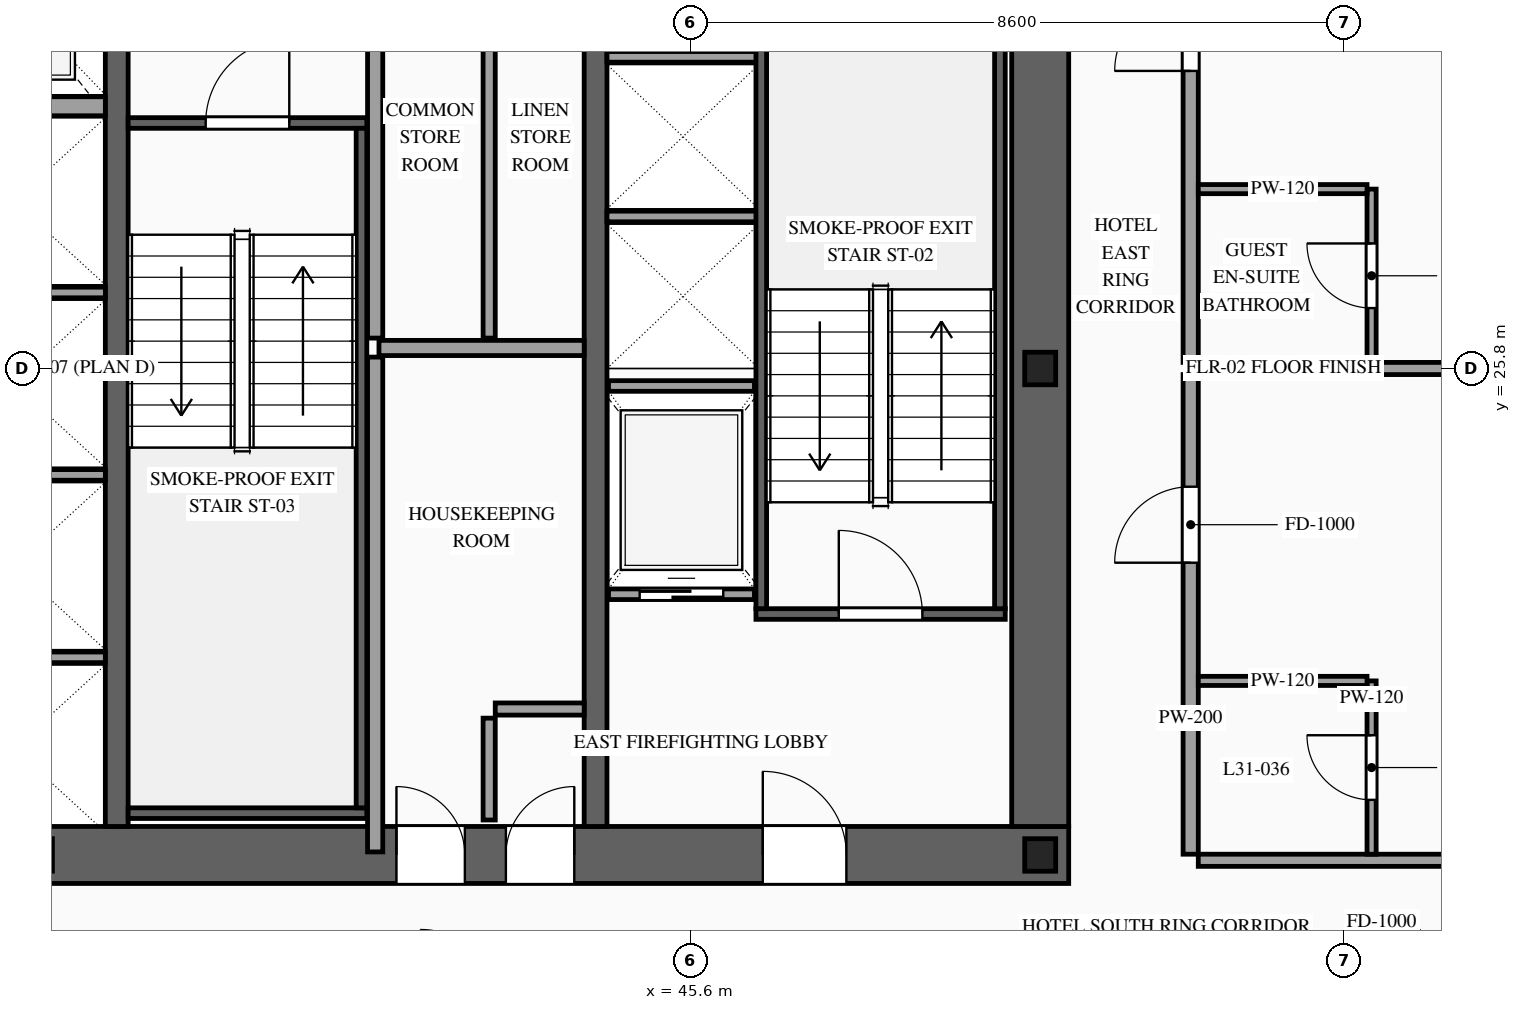
"""IFC4 building model, lengths in metres.
Left out: names, types, materials, properties, quantities, classifications, styles, units other than length and angle.
Written with IfcOpenShell. Run it as: python <this file> out.ifc"""

import sys

from ifc_helpers import new_model, si_unit, direction, frame, frame_2d, origin, origin_2d, place, context, subcontext, project, spatial, rectangle, i_section, extrude, source, transform, mapped, element, fill, save


model = new_model("IFC4")
c1 = context("Model", 3, precision=1e-05, world=origin(), true_north=direction((0.0, 1.0)))
c2 = subcontext(c1, "Body", "Model", "MODEL_VIEW")
j1 = project(units=[si_unit("LENGTHUNIT", "METRE"), si_unit("PLANEANGLEUNIT", "RADIAN")], contexts=[c1])
p1 = place(None, origin())
s1 = spatial("IfcSite", under=j1, at=p1, CompositionType="ELEMENT")
p2 = place(p1, origin())
s2 = spatial("IfcBuilding", under=s1, at=p2, CompositionType="ELEMENT")
p3 = place(p2, frame((0.0, 0.0, 119.0)))
s3 = spatial("IfcBuildingStorey", under=s2, at=p3, CompositionType="ELEMENT", Elevation=119.0)
p4 = place(p3, frame((23.425, 19.4, 0.0), z_axis=(0.0, 0.0, 1.0), x_axis=(1.0, 0.0, 0.0)))
e1 = element("IfcWall", 1, at=p4, inside=s3, PredefinedType="SHEAR", context=c2, shape_type="SweptSolid", body=[
    extrude(rectangle(XDim=27.15, YDim=0.75, at=frame_2d((13.575, 0.0))), origin(), (0.0, 0.0, 1.0), 3.6),
])
p5 = place(p4, frame((2.025, 0.0, 0.0)))
e2 = element("IfcOpeningElement", 2, at=p5, cuts=e1, PredefinedType="OPENING", context=c2, shape_type="SweptSolid", body=[
    extrude(rectangle(XDim=1.1, YDim=2.2, at=frame_2d((0.55, 1.1))), frame((0.0, 0.39, 0.0), z_axis=(0.0, -1.0, 0.0), x_axis=(1.0, 0.0, 0.0)), (0.0, 0.0, 1.0), 0.78),
])
p6 = place(p4, frame((9.925, 0.0, 0.0)))
e3 = element("IfcOpeningElement", 3, at=p6, cuts=e1, PredefinedType="OPENING", context=c2, shape_type="SweptSolid", body=[
    extrude(rectangle(XDim=1.1, YDim=2.2, at=frame_2d((0.55, 1.1))), frame((0.0, 0.39, 0.0), z_axis=(0.0, -1.0, 0.0), x_axis=(1.0, 0.0, 0.0)), (0.0, 0.0, 1.0), 0.78),
])
p7 = place(p4, frame((23.125, 0.0, 0.0)))
e4 = element("IfcOpeningElement", 4, at=p7, cuts=e1, PredefinedType="OPENING", context=c2, shape_type="SweptSolid", body=[
    extrude(rectangle(XDim=1.1, YDim=2.2, at=frame_2d((0.55, 1.1))), frame((0.0, 0.39, 0.0), z_axis=(0.0, -1.0, 0.0), x_axis=(1.0, 0.0, 0.0)), (0.0, 0.0, 1.0), 0.78),
])
p8 = place(p4, frame((19.745, 0.0, 0.0)))
e5 = element("IfcOpeningElement", 5, at=p8, cuts=e1, PredefinedType="OPENING", context=c2, shape_type="SweptSolid", body=[
    extrude(rectangle(XDim=0.9, YDim=2.15, at=frame_2d((0.45, 1.075))), frame((0.0, 0.39, 0.0), z_axis=(0.0, -1.0, 0.0), x_axis=(1.0, 0.0, 0.0)), (0.0, 0.0, 1.0), 0.78),
])
p9 = place(p4, frame((18.305, 0.0, 0.0)))
e6 = element("IfcOpeningElement", 6, at=p9, cuts=e1, PredefinedType="OPENING", context=c2, shape_type="SweptSolid", body=[
    extrude(rectangle(XDim=0.9, YDim=2.15, at=frame_2d((0.45, 1.075))), frame((0.0, 0.39, 0.0), z_axis=(0.0, -1.0, 0.0), x_axis=(1.0, 0.0, 0.0)), (0.0, 0.0, 1.0), 0.78),
])
m1 = source(origin(), c2, "Body", "SweptSolid", [
    extrude(rectangle(XDim=12.05, YDim=0.75, at=frame_2d((6.025, 0.0))), origin(), (0.0, 0.0, 1.0), 3.6),
])
p10 = place(p3, frame((50.2, 19.775, 0.0), z_axis=(0.0, 0.0, 1.0), x_axis=(0.0, 1.0, 0.0)))
e7 = element("IfcWall", 7, at=p10, inside=s3, PredefinedType="SHEAR", context=c2, shape_type="MappedRepresentation", body=[
    mapped(m1, transform((0.0, 0.0, 0.0), scale=1.0)),
])
m2 = source(origin(), c2, "Body", "SweptSolid", [
    extrude(rectangle(XDim=12.05, YDim=0.3, at=frame_2d((6.025, 0.0))), origin(), (0.0, 0.0, 1.0), 3.6),
])
for number, where, z_axis, x_axis in (
    (8, (38.05, 19.775, 0.0), (0.0, 0.0, 1.0), (0.0, 1.0, 0.0)),
    (9, (44.35, 19.775, 0.0), (0.0, 0.0, 1.0), (0.0, 1.0, 0.0)),
):
    element("IfcWall", number, at=place(p3, frame(where, z_axis=z_axis, x_axis=x_axis)), inside=s3, PredefinedType="SOLIDWALL", context=c2, shape_type="MappedRepresentation", body=[
        mapped(m2, transform((0.0, 0.0, 0.0), scale=1.0)),
    ])
m3 = source(origin(), c2, "Body", "SweptSolid", [
    extrude(i_section(OverallWidth=0.407, OverallDepth=0.428, WebThickness=0.02, FlangeThickness=0.035, at=origin_2d()), origin(), (0.0, 0.0, 1.0), 3.6),
])
for number, where, z_axis, x_axis in (
    (10, (37.0, 19.4, 0.0), (0.0, 0.0, 1.0), (1.0, 0.0, 0.0)),
    (11, (50.2, 19.4, 0.0), (0.0, 0.0, 1.0), (1.0, 0.0, 0.0)),
    (12, (50.2, 25.8, 0.0), (0.0, 0.0, 1.0), (1.0, 0.0, 0.0)),
):
    element("IfcColumn", number, at=place(p3, frame(where, z_axis=z_axis, x_axis=x_axis)), inside=s3, PredefinedType="COLUMN", context=c2, shape_type="MappedRepresentation", body=[
        mapped(m3, transform((0.0, 0.0, 0.0), scale=1.0)),
    ])
p11 = place(p3, frame((44.52, 22.83, 0.0), z_axis=(0.0, 0.0, 1.0), x_axis=(1.0, 0.0, 0.0)))
e13 = element("IfcWall", 13, at=p11, inside=s3, PredefinedType="SOLIDWALL", context=c2, shape_type="SweptSolid", body=[
    extrude(rectangle(XDim=1.92, YDim=0.14, at=frame_2d((0.96, 0.0))), origin(), (0.0, 0.0, 1.0), 3.38),
])
p12 = place(p11, frame((0.41, 0.0, 0.0)))
e14 = element("IfcOpeningElement", 14, at=p12, cuts=e13, PredefinedType="OPENING", context=c2, shape_type="SweptSolid", body=[
    extrude(rectangle(XDim=1.1, YDim=2.2, at=frame_2d((0.55, 1.1))), frame((0.0, 0.085, 0.0), z_axis=(0.0, -1.0, 0.0), x_axis=(1.0, 0.0, 0.0)), (0.0, 0.0, 1.0), 0.17),
])
m4 = source(origin(), c2, "Body", "SweptSolid", [
    extrude(rectangle(XDim=1.92, YDim=0.14, at=frame_2d((0.96, 0.0))), origin(), (0.0, 0.0, 1.0), 3.38),
])
p13 = place(p3, frame((44.52, 25.57, 0.0), z_axis=(0.0, 0.0, 1.0), x_axis=(1.0, 0.0, 0.0)))
e15 = element("IfcWall", 15, at=p13, inside=s3, PredefinedType="SOLIDWALL", context=c2, shape_type="MappedRepresentation", body=[
    mapped(m4, transform((0.0, 0.0, 0.0), scale=1.0)),
])
m5 = source(origin(), c2, "Body", "SweptSolid", [
    extrude(rectangle(XDim=2.4, YDim=0.14, at=frame_2d((1.2, 0.0))), origin(), (0.0, 0.0, 1.0), 3.38),
])
for number, where, z_axis, x_axis in (
    (16, (35.5, 22.0, 0.0), (0.0, 0.0, 1.0), (1.0, 0.0, 0.0)),
    (17, (35.5, 24.4, 0.0), (0.0, 0.0, 1.0), (1.0, 0.0, 0.0)),
    (18, (35.5, 26.8, 0.0), (0.0, 0.0, 1.0), (1.0, 0.0, 0.0)),
):
    element("IfcWall", number, at=place(p3, frame(where, z_axis=z_axis, x_axis=x_axis)), inside=s3, PredefinedType="SOLIDWALL", context=c2, shape_type="MappedRepresentation", body=[
        mapped(m5, transform((0.0, 0.0, 0.0), scale=1.0)),
    ])
m6 = source(origin(), c2, "Body", "SweptSolid", [
    extrude(rectangle(XDim=2.4, YDim=0.25, at=frame_2d((1.2, 0.0))), origin(), (0.0, 0.0, 1.0), 3.38),
])
p14 = place(p3, frame((35.5, 29.25, 0.0), z_axis=(0.0, 0.0, 1.0), x_axis=(1.0, 0.0, 0.0)))
e19 = element("IfcWall", 19, at=p14, inside=s3, PredefinedType="SOLIDWALL", context=c2, shape_type="MappedRepresentation", body=[
    mapped(m6, transform((0.0, 0.0, 0.0), scale=1.0)),
])
m7 = source(origin(), c2, "Body", "SweptSolid", [
    extrude(rectangle(XDim=2.0, YDim=0.14, at=frame_2d((1.0, 0.0))), origin(), (0.0, 0.0, 1.0), 3.38),
])
for number, where, z_axis, x_axis in (
    (20, (44.5, 27.8, 0.0), (0.0, 0.0, 1.0), (1.0, 0.0, 0.0)),
    (21, (44.5, 29.9, 0.0), (0.0, 0.0, 1.0), (1.0, 0.0, 0.0)),
):
    element("IfcWall", number, at=place(p3, frame(where, z_axis=z_axis, x_axis=x_axis)), inside=s3, PredefinedType="SOLIDWALL", context=c2, shape_type="MappedRepresentation", body=[
        mapped(m7, transform((0.0, 0.0, 0.0), scale=1.0)),
    ])
p15 = place(p3, frame((46.46, 22.57, 0.0), z_axis=(0.0, 0.0, 1.0), x_axis=(1.0, 0.0, 0.0)))
e22 = element("IfcWall", 22, at=p15, inside=s3, PredefinedType="SOLIDWALL", context=c2, shape_type="SweptSolid", body=[
    extrude(rectangle(XDim=3.28, YDim=0.14, at=frame_2d((1.64, 0.0))), origin(), (0.0, 0.0, 1.0), 3.38),
])
p16 = place(p15, frame((1.09, 0.0, 0.0)))
e23 = element("IfcOpeningElement", 23, at=p16, cuts=e22, PredefinedType="OPENING", context=c2, shape_type="SweptSolid", body=[
    extrude(rectangle(XDim=1.1, YDim=2.2, at=frame_2d((0.55, 1.1))), frame((0.0, 0.085, 0.0), z_axis=(0.0, -1.0, 0.0), x_axis=(1.0, 0.0, 0.0)), (0.0, 0.0, 1.0), 0.17),
])
m8 = source(origin(), c2, "Body", "SweptSolid", [
    extrude(rectangle(XDim=8.94, YDim=0.14, at=frame_2d((4.47, 0.0))), origin(), (0.0, 0.0, 1.0), 3.38),
])
for number, where, z_axis, x_axis in (
    (24, (46.53, 22.64, 0.0), (0.0, 0.0, 1.0), (0.0, 1.0, 0.0)),
    (25, (49.67, 22.64, 0.0), (0.0, 0.0, 1.0), (0.0, 1.0, 0.0)),
):
    element("IfcWall", number, at=place(p3, frame(where, z_axis=z_axis, x_axis=x_axis)), inside=s3, PredefinedType="SOLIDWALL", context=c2, shape_type="MappedRepresentation", body=[
        mapped(m8, transform((0.0, 0.0, 0.0), scale=1.0)),
    ])
p17 = place(p3, frame((38.2, 29.03, 0.0), z_axis=(0.0, 0.0, 1.0), x_axis=(1.0, 0.0, 0.0)))
e26 = element("IfcWall", 26, at=p17, inside=s3, PredefinedType="SOLIDWALL", context=c2, shape_type="SweptSolid", body=[
    extrude(rectangle(XDim=3.14, YDim=0.14, at=frame_2d((1.57, 0.0))), origin(), (0.0, 0.0, 1.0), 3.38),
])
p18 = place(p17, frame((1.02, 0.0, 0.0)))
e27 = element("IfcOpeningElement", 27, at=p18, cuts=e26, PredefinedType="OPENING", context=c2, shape_type="SweptSolid", body=[
    extrude(rectangle(XDim=1.1, YDim=2.2, at=frame_2d((0.55, 1.1))), frame((0.0, 0.085, 0.0), z_axis=(0.0, -1.0, 0.0), x_axis=(1.0, 0.0, 0.0)), (0.0, 0.0, 1.0), 0.17),
])
m9 = source(origin(), c2, "Body", "SweptSolid", [
    extrude(rectangle(XDim=3.14, YDim=0.14, at=frame_2d((1.57, 0.0))), origin(), (0.0, 0.0, 1.0), 3.38),
])
p19 = place(p3, frame((38.2, 19.95, 0.0), z_axis=(0.0, 0.0, 1.0), x_axis=(1.0, 0.0, 0.0)))
e28 = element("IfcWall", 28, at=p19, inside=s3, PredefinedType="SOLIDWALL", context=c2, shape_type="MappedRepresentation", body=[
    mapped(m9, transform((0.0, 0.0, 0.0), scale=1.0)),
])
m10 = source(origin(), c2, "Body", "SweptSolid", [
    extrude(rectangle(XDim=8.94, YDim=0.14, at=frame_2d((4.47, 0.0))), origin(), (0.0, 0.0, 1.0), 3.38),
])
p20 = place(p3, frame((41.27, 20.02, 0.0), z_axis=(0.0, 0.0, 1.0), x_axis=(0.0, 1.0, 0.0)))
e29 = element("IfcWall", 29, at=p20, inside=s3, PredefinedType="SOLIDWALL", context=c2, shape_type="MappedRepresentation", body=[
    mapped(m10, transform((0.0, 0.0, 0.0), scale=1.0)),
])
m11 = source(origin(), c2, "Body", "SweptSolid", [
    extrude(rectangle(XDim=1.34, YDim=0.16, at=frame_2d((0.67, 0.0))), origin(), (0.0, 0.0, 1.0), 3.38),
])
p21 = place(p3, frame((42.95, 19.86, 0.0), z_axis=(0.0, 0.0, 1.0), x_axis=(0.0, 1.0, 0.0)))
e30 = element("IfcWall", 30, at=p21, inside=s3, PredefinedType="PARTITIONING", context=c2, shape_type="MappedRepresentation", body=[
    mapped(m11, transform((0.0, 0.0, 0.0), scale=1.0)),
])
m12 = source(origin(), c2, "Body", "SweptSolid", [
    extrude(rectangle(XDim=1.17, YDim=0.16, at=frame_2d((0.585, 0.0))), origin(), (0.0, 0.0, 1.0), 3.38),
])
p22 = place(p3, frame((43.03, 21.32, 0.0), z_axis=(0.0, 0.0, 1.0), x_axis=(1.0, 0.0, 0.0)))
e31 = element("IfcWall", 31, at=p22, inside=s3, PredefinedType="PARTITIONING", context=c2, shape_type="MappedRepresentation", body=[
    mapped(m12, transform((0.0, 0.0, 0.0), scale=1.0)),
])
m13 = source(origin(), c2, "Body", "SweptSolid", [
    extrude(rectangle(XDim=6.51, YDim=0.2, at=frame_2d((3.255, 0.0))), origin(), (0.0, 0.0, 1.0), 3.38),
])
p23 = place(p3, frame((41.45, 19.44, 0.0), z_axis=(0.0, 0.0, 1.0), x_axis=(0.0, 1.0, 0.0)))
e32 = element("IfcWall", 32, at=p23, inside=s3, PredefinedType="PARTITIONING", context=c2, shape_type="MappedRepresentation", body=[
    mapped(m13, transform((0.0, 0.0, 0.0), scale=1.0)),
])
m14 = source(origin(), c2, "Body", "SweptSolid", [
    extrude(rectangle(XDim=2.7, YDim=0.2, at=frame_2d((1.35, 0.0))), origin(), (0.0, 0.0, 1.0), 3.38),
])
p24 = place(p3, frame((41.5, 26.07, 0.0), z_axis=(0.0, 0.0, 1.0), x_axis=(1.0, 0.0, 0.0)))
e33 = element("IfcWall", 33, at=p24, inside=s3, PredefinedType="PARTITIONING", context=c2, shape_type="MappedRepresentation", body=[
    mapped(m14, transform((0.0, 0.0, 0.0), scale=1.0)),
])
m15 = source(origin(), c2, "Body", "SweptSolid", [
    extrude(rectangle(XDim=5.96, YDim=0.2, at=frame_2d((2.98, 0.0))), origin(), (0.0, 0.0, 1.0), 3.38),
])
p25 = place(p3, frame((41.45, 26.2, 0.0), z_axis=(0.0, 0.0, 1.0), x_axis=(0.0, 1.0, 0.0)))
e34 = element("IfcWall", 34, at=p25, inside=s3, PredefinedType="PARTITIONING", context=c2, shape_type="MappedRepresentation", body=[
    mapped(m15, transform((0.0, 0.0, 0.0), scale=1.0)),
])
m16 = source(origin(), c2, "Body", "SweptSolid", [
    extrude(rectangle(XDim=5.96, YDim=0.16, at=frame_2d((2.98, 0.0))), origin(), (0.0, 0.0, 1.0), 3.38),
])
p26 = place(p3, frame((42.95, 26.2, 0.0), z_axis=(0.0, 0.0, 1.0), x_axis=(0.0, 1.0, 0.0)))
e35 = element("IfcWall", 35, at=p26, inside=s3, PredefinedType="PARTITIONING", context=c2, shape_type="MappedRepresentation", body=[
    mapped(m16, transform((0.0, 0.0, 0.0), scale=1.0)),
])
p27 = place(p3, frame((52.18, 19.41, 0.0), z_axis=(0.0, 0.0, 1.0), x_axis=(0.0, 1.0, 0.0)))
e36 = element("IfcWall", 36, at=p27, inside=s3, PredefinedType="PARTITIONING", context=c2, shape_type="SweptSolid", body=[
    extrude(rectangle(XDim=6.31, YDim=0.2, at=frame_2d((3.155, 0.0))), origin(), (0.0, 0.0, 1.0), 3.38),
])
p28 = place(p27, frame((3.835, 0.0, 0.0)))
e37 = element("IfcOpeningElement", 37, at=p28, cuts=e36, PredefinedType="OPENING", context=c2, shape_type="SweptSolid", body=[
    extrude(rectangle(XDim=1.0, YDim=2.2, at=frame_2d((0.5, 1.1))), frame((0.0, 0.115, 0.0), z_axis=(0.0, -1.0, 0.0), x_axis=(1.0, 0.0, 0.0)), (0.0, 0.0, 1.0), 0.23),
])
m17 = source(origin(), c2, "Body", "SweptSolid", [
    extrude(rectangle(XDim=8.17, YDim=0.16, at=frame_2d((4.085, 0.0))), origin(), (0.0, 0.0, 1.0), 2.675),
])
p29 = place(p3, frame((52.28, 25.8, 0.0), z_axis=(0.0, 0.0, 1.0), x_axis=(1.0, 0.0, 0.0)))
e38 = element("IfcWall", 38, at=p29, inside=s3, PredefinedType="PARTITIONING", context=c2, shape_type="MappedRepresentation", body=[
    mapped(m17, transform((0.0, 0.0, 0.0), scale=1.0)),
])
m18 = source(origin(), c2, "Body", "SweptSolid", [
    extrude(rectangle(XDim=8.17, YDim=0.16, at=frame_2d((4.085, 0.0))), origin(), (0.0, 0.0, 1.0), 2.875),
])
p30 = place(p3, frame((52.28, 19.33, 0.0), z_axis=(0.0, 0.0, 1.0), x_axis=(1.0, 0.0, 0.0)))
e39 = element("IfcWall", 39, at=p30, inside=s3, PredefinedType="PARTITIONING", context=c2, shape_type="MappedRepresentation", body=[
    mapped(m18, transform((0.0, 0.0, 0.0), scale=1.0)),
])
p31 = place(p3, frame((54.56, 19.41, 0.0), z_axis=(0.0, 0.0, 1.0), x_axis=(0.0, 1.0, 0.0)))
e40 = element("IfcWall", 40, at=p31, inside=s3, PredefinedType="PARTITIONING", context=c2, shape_type="SweptSolid", body=[
    extrude(rectangle(XDim=2.28, YDim=0.12, at=frame_2d((1.14, 0.0))), origin(), (0.0, 0.0, 1.0), 3.38),
])
p32 = place(p31, frame((0.715, 0.0, 0.0)))
e41 = element("IfcOpeningElement", 41, at=p32, cuts=e40, PredefinedType="OPENING", context=c2, shape_type="SweptSolid", body=[
    extrude(rectangle(XDim=0.85, YDim=2.1, at=frame_2d((0.425, 1.05))), frame((0.0, 0.075, 0.0), z_axis=(0.0, -1.0, 0.0), x_axis=(1.0, 0.0, 0.0)), (0.0, 0.0, 1.0), 0.15),
])
m19 = source(origin(), c2, "Body", "SweptSolid", [
    extrude(rectangle(XDim=2.22, YDim=0.12, at=frame_2d((1.11, 0.0))), origin(), (0.0, 0.0, 1.0), 3.38),
])
p33 = place(p3, frame((52.28, 21.69, 0.0), z_axis=(0.0, 0.0, 1.0), x_axis=(1.0, 0.0, 0.0)))
e42 = element("IfcWall", 42, at=p33, inside=s3, PredefinedType="PARTITIONING", context=c2, shape_type="MappedRepresentation", body=[
    mapped(m19, transform((0.0, 0.0, 0.0), scale=1.0)),
])
p34 = place(p3, frame((52.18, 25.88, 0.0), z_axis=(0.0, 0.0, 1.0), x_axis=(0.0, 1.0, 0.0)))
e43 = element("IfcWall", 43, at=p34, inside=s3, PredefinedType="PARTITIONING", context=c2, shape_type="SweptSolid", body=[
    extrude(rectangle(XDim=6.31, YDim=0.2, at=frame_2d((3.155, 0.0))), origin(), (0.0, 0.0, 1.0), 3.38),
])
p35 = place(p34, frame((3.835, 0.0, 0.0)))
e44 = element("IfcOpeningElement", 44, at=p35, cuts=e43, PredefinedType="OPENING", context=c2, shape_type="SweptSolid", body=[
    extrude(rectangle(XDim=1.0, YDim=2.2, at=frame_2d((0.5, 1.1))), frame((0.0, 0.115, 0.0), z_axis=(0.0, -1.0, 0.0), x_axis=(1.0, 0.0, 0.0)), (0.0, 0.0, 1.0), 0.23),
])
p36 = place(p3, frame((54.56, 25.88, 0.0), z_axis=(0.0, 0.0, 1.0), x_axis=(0.0, 1.0, 0.0)))
e45 = element("IfcWall", 45, at=p36, inside=s3, PredefinedType="PARTITIONING", context=c2, shape_type="SweptSolid", body=[
    extrude(rectangle(XDim=2.28, YDim=0.12, at=frame_2d((1.14, 0.0))), origin(), (0.0, 0.0, 1.0), 3.38),
])
p37 = place(p36, frame((0.715, 0.0, 0.0)))
e46 = element("IfcOpeningElement", 46, at=p37, cuts=e45, PredefinedType="OPENING", context=c2, shape_type="SweptSolid", body=[
    extrude(rectangle(XDim=0.85, YDim=2.1, at=frame_2d((0.425, 1.05))), frame((0.0, 0.075, 0.0), z_axis=(0.0, -1.0, 0.0), x_axis=(1.0, 0.0, 0.0)), (0.0, 0.0, 1.0), 0.15),
])
p38 = place(p3, frame((52.28, 28.16, 0.0), z_axis=(0.0, 0.0, 1.0), x_axis=(1.0, 0.0, 0.0)))
e47 = element("IfcWall", 47, at=p38, inside=s3, PredefinedType="PARTITIONING", context=c2, shape_type="MappedRepresentation", body=[
    mapped(m19, transform((0.0, 0.0, 0.0), scale=1.0)),
])
m20 = source(origin(), c2, "Body", "SweptSolid", [
    extrude(rectangle(XDim=1.1, YDim=2.2, at=frame_2d((0.55, 1.1))), frame((0.0, 0.025, 0.0), z_axis=(0.0, -1.0, 0.0), x_axis=(1.0, 0.0, 0.0)), (0.0, 0.0, 1.0), 0.05),
])
p39 = place(p12, origin())
e48 = element("IfcDoor", 48, at=p39, inside=s3, OperationType="SLIDING_TO_RIGHT", PredefinedType="DOOR", context=c2, shape_type="MappedRepresentation", body=[
    mapped(m20, transform((0.0, 0.0, 0.0), scale=1.0)),
])
fill(e14, e48)
m21 = source(origin(), c2, "Body", "SweptSolid", [
    extrude(rectangle(XDim=1.1, YDim=2.2, at=frame_2d((0.55, 1.1))), frame((0.0, 0.025, 0.0), z_axis=(0.0, -1.0, 0.0), x_axis=(1.0, 0.0, 0.0)), (0.0, 0.0, 1.0), 0.05),
])
p40 = place(p16, origin())
e49 = element("IfcDoor", 49, at=p40, inside=s3, OperationType="SINGLE_SWING_LEFT", PredefinedType="DOOR", context=c2, shape_type="MappedRepresentation", body=[
    mapped(m21, transform((0.0, 0.0, 0.0), scale=1.0)),
])
fill(e23, e49)
p41 = place(p18, origin())
e50 = element("IfcDoor", 50, at=p41, inside=s3, OperationType="SINGLE_SWING_RIGHT", PredefinedType="DOOR", context=c2, shape_type="MappedRepresentation", body=[
    mapped(m21, transform((0.0, 0.0, 0.0), scale=1.0)),
])
fill(e27, e50)
p42 = place(p7, origin())
e51 = element("IfcDoor", 51, at=p42, inside=s3, OperationType="SINGLE_SWING_LEFT", PredefinedType="DOOR", context=c2, shape_type="MappedRepresentation", body=[
    mapped(m21, transform((0.0, 0.0, 0.0), scale=1.0)),
])
fill(e4, e51)
m22 = source(origin(), c2, "Body", "SweptSolid", [
    extrude(rectangle(XDim=0.9, YDim=2.15, at=frame_2d((0.45, 1.075))), frame((0.0, 0.025, 0.0), z_axis=(0.0, -1.0, 0.0), x_axis=(1.0, 0.0, 0.0)), (0.0, 0.0, 1.0), 0.05),
])
p43 = place(p8, origin())
e52 = element("IfcDoor", 52, at=p43, inside=s3, OperationType="SINGLE_SWING_RIGHT", PredefinedType="DOOR", context=c2, shape_type="MappedRepresentation", body=[
    mapped(m22, transform((0.0, 0.0, 0.0), scale=1.0)),
])
fill(e5, e52)
p44 = place(p9, origin())
e53 = element("IfcDoor", 53, at=p44, inside=s3, OperationType="SINGLE_SWING_LEFT", PredefinedType="DOOR", context=c2, shape_type="MappedRepresentation", body=[
    mapped(m22, transform((0.0, 0.0, 0.0), scale=1.0)),
])
fill(e6, e53)
m23 = source(origin(), c2, "Body", "SweptSolid", [
    extrude(rectangle(XDim=1.0, YDim=2.2, at=frame_2d((0.5, 1.1))), frame((0.0, 0.025, 0.0), z_axis=(0.0, -1.0, 0.0), x_axis=(1.0, 0.0, 0.0)), (0.0, 0.0, 1.0), 0.05),
])
p45 = place(p28, origin())
e54 = element("IfcDoor", 54, at=p45, inside=s3, OperationType="SINGLE_SWING_LEFT", PredefinedType="DOOR", context=c2, shape_type="MappedRepresentation", body=[
    mapped(m23, transform((0.0, 0.0, 0.0), scale=1.0)),
])
fill(e37, e54)
m24 = source(origin(), c2, "Body", "SweptSolid", [
    extrude(rectangle(XDim=0.85, YDim=2.1, at=frame_2d((0.425, 1.05))), frame((0.0, 0.025, 0.0), z_axis=(0.0, -1.0, 0.0), x_axis=(1.0, 0.0, 0.0)), (0.0, 0.0, 1.0), 0.05),
])
p46 = place(p32, origin())
e55 = element("IfcDoor", 55, at=p46, inside=s3, OperationType="SINGLE_SWING_RIGHT", PredefinedType="DOOR", context=c2, shape_type="MappedRepresentation", body=[
    mapped(m24, transform((0.0, 0.0, 0.0), scale=1.0)),
])
fill(e41, e55)
p47 = place(p35, origin())
e56 = element("IfcDoor", 56, at=p47, inside=s3, OperationType="SINGLE_SWING_LEFT", PredefinedType="DOOR", context=c2, shape_type="MappedRepresentation", body=[
    mapped(m23, transform((0.0, 0.0, 0.0), scale=1.0)),
])
fill(e44, e56)
p48 = place(p37, origin())
e57 = element("IfcDoor", 57, at=p48, inside=s3, OperationType="SINGLE_SWING_RIGHT", PredefinedType="DOOR", context=c2, shape_type="MappedRepresentation", body=[
    mapped(m24, transform((0.0, 0.0, 0.0), scale=1.0)),
])
fill(e46, e57)
save(model, sys.argv[1])
